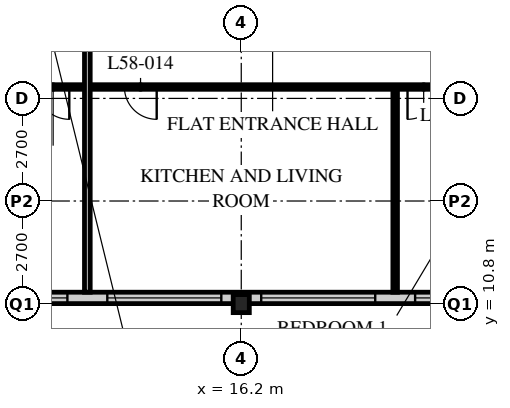
"""IFC4 building model, lengths in metres.
Left out: names, types, materials, properties, quantities, classifications, styles, units other than length and angle.
Written with IfcOpenShell. Run it as: python <this file> out.ifc"""

import sys

from ifc_helpers import new_model, si_unit, direction, frame, frame_2d, origin, origin_2d, place, context, subcontext, project, spatial, rectangle, i_section, extrude, element, fill, save


model = new_model("IFC4")
c1 = context("Model", 3, precision=1e-05, world=origin(), true_north=direction((0.0, 1.0)))
c2 = subcontext(c1, "Body", "Model", "MODEL_VIEW")
j1 = project(units=[si_unit("LENGTHUNIT", "METRE"), si_unit("PLANEANGLEUNIT", "RADIAN")], contexts=[c1])
p1 = place(None, origin())
s1 = spatial("IfcSite", under=j1, at=p1, CompositionType="ELEMENT")
p2 = place(p1, origin())
s2 = spatial("IfcBuilding", under=s1, at=p2, CompositionType="ELEMENT")
p3 = place(p2, frame((0.0, 0.0, 224.4)))
s3 = spatial("IfcBuildingStorey", under=s2, at=p3, CompositionType="ELEMENT", Elevation=224.4)
p4 = place(p3, frame((16.2, 10.8, 0.0), z_axis=(0.0, 0.0, 1.0), x_axis=(1.0, 0.0, 0.0)))
e1 = element("IfcColumn", 1, at=p4, inside=s3, PredefinedType="COLUMN", context=c2, shape_type="SweptSolid", body=[
    extrude(i_section(OverallWidth=0.424, OverallDepth=0.475, WebThickness=0.048, FlangeThickness=0.077, FilletRadius=0.015, at=origin_2d()), origin(), (0.0, 0.0, 1.0), 3.6),
])
p5 = place(p3, frame((8.4, 10.95, 0.0), z_axis=(0.0, 0.0, 1.0), x_axis=(1.0, 0.0, 0.0)))
e2 = element("IfcWall", 2, at=p5, inside=s3, PredefinedType="SOLIDWALL", context=c2, shape_type="SweptSolid", body=[
    extrude(rectangle(XDim=40.2, YDim=0.3, at=frame_2d((20.1, 0.0))), origin(), (0.0, 0.0, 1.0), 3.39),
])
p6 = place(p5, frame((0.225, 0.0, 0.6)))
e3 = element("IfcOpeningElement", 3, at=p6, cuts=e2, PredefinedType="OPENING", context=c2, shape_type="SweptSolid", body=[
    extrude(rectangle(XDim=3.0, YDim=2.0, at=frame_2d((1.5, 1.0))), frame((0.0, 0.16, 0.0), z_axis=(0.0, -1.0, 0.0), x_axis=(1.0, 0.0, 0.0)), (0.0, 0.0, 1.0), 0.32),
])
p7 = place(p5, frame((4.275, 0.0, 0.6)))
e4 = element("IfcOpeningElement", 4, at=p7, cuts=e2, PredefinedType="OPENING", context=c2, shape_type="SweptSolid", body=[
    extrude(rectangle(XDim=3.0, YDim=2.0, at=frame_2d((1.5, 1.0))), frame((0.0, 0.16, 0.0), z_axis=(0.0, -1.0, 0.0), x_axis=(1.0, 0.0, 0.0)), (0.0, 0.0, 1.0), 0.32),
])
p8 = place(p5, frame((8.325, 0.0, 0.6)))
e5 = element("IfcOpeningElement", 5, at=p8, cuts=e2, PredefinedType="OPENING", context=c2, shape_type="SweptSolid", body=[
    extrude(rectangle(XDim=3.0, YDim=2.0, at=frame_2d((1.5, 1.0))), frame((0.0, 0.16, 0.0), z_axis=(0.0, -1.0, 0.0), x_axis=(1.0, 0.0, 0.0)), (0.0, 0.0, 1.0), 0.32),
])
p9 = place(p5, frame((12.375, 0.0, 0.6)))
e6 = element("IfcOpeningElement", 6, at=p9, cuts=e2, PredefinedType="OPENING", context=c2, shape_type="SweptSolid", body=[
    extrude(rectangle(XDim=3.0, YDim=2.0, at=frame_2d((1.5, 1.0))), frame((0.0, 0.16, 0.0), z_axis=(0.0, -1.0, 0.0), x_axis=(1.0, 0.0, 0.0)), (0.0, 0.0, 1.0), 0.32),
])
p10 = place(p5, frame((16.425, 0.0, 0.6)))
e7 = element("IfcOpeningElement", 7, at=p10, cuts=e2, PredefinedType="OPENING", context=c2, shape_type="SweptSolid", body=[
    extrude(rectangle(XDim=3.0, YDim=2.0, at=frame_2d((1.5, 1.0))), frame((0.0, 0.16, 0.0), z_axis=(0.0, -1.0, 0.0), x_axis=(1.0, 0.0, 0.0)), (0.0, 0.0, 1.0), 0.32),
])
p11 = place(p5, frame((20.475, 0.0, 0.6)))
e8 = element("IfcOpeningElement", 8, at=p11, cuts=e2, PredefinedType="OPENING", context=c2, shape_type="SweptSolid", body=[
    extrude(rectangle(XDim=3.0, YDim=2.0, at=frame_2d((1.5, 1.0))), frame((0.0, 0.16, 0.0), z_axis=(0.0, -1.0, 0.0), x_axis=(1.0, 0.0, 0.0)), (0.0, 0.0, 1.0), 0.32),
])
p12 = place(p5, frame((24.525, 0.0, 0.6)))
e9 = element("IfcOpeningElement", 9, at=p12, cuts=e2, PredefinedType="OPENING", context=c2, shape_type="SweptSolid", body=[
    extrude(rectangle(XDim=3.0, YDim=2.0, at=frame_2d((1.5, 1.0))), frame((0.0, 0.16, 0.0), z_axis=(0.0, -1.0, 0.0), x_axis=(1.0, 0.0, 0.0)), (0.0, 0.0, 1.0), 0.32),
])
p13 = place(p5, frame((28.575, 0.0, 0.6)))
e10 = element("IfcOpeningElement", 10, at=p13, cuts=e2, PredefinedType="OPENING", context=c2, shape_type="SweptSolid", body=[
    extrude(rectangle(XDim=3.0, YDim=2.0, at=frame_2d((1.5, 1.0))), frame((0.0, 0.16, 0.0), z_axis=(0.0, -1.0, 0.0), x_axis=(1.0, 0.0, 0.0)), (0.0, 0.0, 1.0), 0.32),
])
p14 = place(p5, frame((32.625, 0.0, 0.6)))
e11 = element("IfcOpeningElement", 11, at=p14, cuts=e2, PredefinedType="OPENING", context=c2, shape_type="SweptSolid", body=[
    extrude(rectangle(XDim=3.0, YDim=2.0, at=frame_2d((1.5, 1.0))), frame((0.0, 0.16, 0.0), z_axis=(0.0, -1.0, 0.0), x_axis=(1.0, 0.0, 0.0)), (0.0, 0.0, 1.0), 0.32),
])
p15 = place(p5, frame((36.675, 0.0, 0.6)))
e12 = element("IfcOpeningElement", 12, at=p15, cuts=e2, PredefinedType="OPENING", context=c2, shape_type="SweptSolid", body=[
    extrude(rectangle(XDim=3.0, YDim=2.0, at=frame_2d((1.5, 1.0))), frame((0.0, 0.16, 0.0), z_axis=(0.0, -1.0, 0.0), x_axis=(1.0, 0.0, 0.0)), (0.0, 0.0, 1.0), 0.32),
])
p16 = place(p3, frame((20.25, 16.5, 0.0), z_axis=(0.0, 0.0, 1.0), x_axis=(0.0, -1.0, 0.0)))
e13 = element("IfcWall", 13, at=p16, inside=s3, PredefinedType="PARTITIONING", context=c2, shape_type="SweptSolid", body=[
    extrude(rectangle(XDim=5.4, YDim=0.12, at=frame_2d((2.7, 0.0))), origin(), (0.0, 0.0, 1.0), 3.39),
])
p17 = place(p3, frame((8.1, 16.5, 0.0), z_axis=(0.0, 0.0, 1.0), x_axis=(1.0, 0.0, 0.0)))
e14 = element("IfcWall", 14, at=p17, inside=s3, PredefinedType="PARTITIONING", context=c2, shape_type="SweptSolid", body=[
    extrude(rectangle(XDim=28.35, YDim=0.12, at=frame_2d((14.175, 0.0))), origin(), (0.0, 0.0, 1.0), 3.39),
])
p18 = place(p17, frame((5.025, 0.0, 0.0)))
e15 = element("IfcOpeningElement", 15, at=p18, cuts=e14, PredefinedType="OPENING", context=c2, shape_type="SweptSolid", body=[
    extrude(rectangle(XDim=0.85, YDim=2.1, at=frame_2d((0.425, 1.05))), frame((0.0, 0.07, 0.0), z_axis=(0.0, -1.0, 0.0), x_axis=(1.0, 0.0, 0.0)), (0.0, 0.0, 1.0), 0.14),
])
p19 = place(p17, frame((12.475, 0.0, 0.0)))
e16 = element("IfcOpeningElement", 16, at=p19, cuts=e14, PredefinedType="OPENING", context=c2, shape_type="SweptSolid", body=[
    extrude(rectangle(XDim=0.85, YDim=2.1, at=frame_2d((0.425, 1.05))), frame((0.0, 0.07, 0.0), z_axis=(0.0, -1.0, 0.0), x_axis=(1.0, 0.0, 0.0)), (0.0, 0.0, 1.0), 0.14),
])
p20 = place(p17, frame((17.175, 0.0, 0.0)))
e17 = element("IfcOpeningElement", 17, at=p20, cuts=e14, PredefinedType="OPENING", context=c2, shape_type="SweptSolid", body=[
    extrude(rectangle(XDim=0.85, YDim=2.1, at=frame_2d((0.425, 1.05))), frame((0.0, 0.07, 0.0), z_axis=(0.0, -1.0, 0.0), x_axis=(1.0, 0.0, 0.0)), (0.0, 0.0, 1.0), 0.14),
])
p21 = place(p17, frame((24.625, 0.0, 0.0)))
e18 = element("IfcOpeningElement", 18, at=p21, cuts=e14, PredefinedType="OPENING", context=c2, shape_type="SweptSolid", body=[
    extrude(rectangle(XDim=0.85, YDim=2.1, at=frame_2d((0.425, 1.05))), frame((0.0, 0.07, 0.0), z_axis=(0.0, -1.0, 0.0), x_axis=(1.0, 0.0, 0.0)), (0.0, 0.0, 1.0), 0.14),
])
p22 = place(p17, frame((2.725, 0.0, 0.0)))
e19 = element("IfcOpeningElement", 19, at=p22, cuts=e14, PredefinedType="OPENING", context=c2, shape_type="SweptSolid", body=[
    extrude(rectangle(XDim=0.85, YDim=2.1, at=frame_2d((0.425, 1.05))), frame((0.0, 0.07, 0.0), z_axis=(0.0, -1.0, 0.0), x_axis=(1.0, 0.0, 0.0)), (0.0, 0.0, 1.0), 0.14),
])
p23 = place(p3, frame((12.15, 18.9, 0.0), z_axis=(0.0, 0.0, 1.0), x_axis=(0.0, -1.0, 0.0)))
e20 = element("IfcWall", 20, at=p23, inside=s3, PredefinedType="PARTITIONING", context=c2, shape_type="SweptSolid", body=[
    extrude(rectangle(XDim=7.8, YDim=0.15, at=frame_2d((3.9, 0.0))), origin(), (0.0, 0.0, 1.0), 3.39),
])
p24 = place(p6, origin())
e21 = element("IfcWindow", 21, at=p24, inside=s3, PartitioningType="SINGLE_PANEL", PredefinedType="WINDOW", context=c2, shape_type="SweptSolid", body=[
    extrude(rectangle(XDim=3.0, YDim=2.0, at=frame_2d((1.5, 1.0))), frame((0.0, 0.03, 0.0), z_axis=(0.0, -1.0, 0.0), x_axis=(1.0, 0.0, 0.0)), (0.0, 0.0, 1.0), 0.06),
])
fill(e3, e21)
p25 = place(p7, origin())
e22 = element("IfcWindow", 22, at=p25, inside=s3, PartitioningType="SINGLE_PANEL", PredefinedType="WINDOW", context=c2, shape_type="SweptSolid", body=[
    extrude(rectangle(XDim=3.0, YDim=2.0, at=frame_2d((1.5, 1.0))), frame((0.0, 0.03, 0.0), z_axis=(0.0, -1.0, 0.0), x_axis=(1.0, 0.0, 0.0)), (0.0, 0.0, 1.0), 0.06),
])
fill(e4, e22)
p26 = place(p8, origin())
e23 = element("IfcWindow", 23, at=p26, inside=s3, PartitioningType="SINGLE_PANEL", PredefinedType="WINDOW", context=c2, shape_type="SweptSolid", body=[
    extrude(rectangle(XDim=3.0, YDim=2.0, at=frame_2d((1.5, 1.0))), frame((0.0, 0.03, 0.0), z_axis=(0.0, -1.0, 0.0), x_axis=(1.0, 0.0, 0.0)), (0.0, 0.0, 1.0), 0.06),
])
fill(e5, e23)
p27 = place(p9, origin())
e24 = element("IfcWindow", 24, at=p27, inside=s3, PartitioningType="SINGLE_PANEL", PredefinedType="WINDOW", context=c2, shape_type="SweptSolid", body=[
    extrude(rectangle(XDim=3.0, YDim=2.0, at=frame_2d((1.5, 1.0))), frame((0.0, 0.03, 0.0), z_axis=(0.0, -1.0, 0.0), x_axis=(1.0, 0.0, 0.0)), (0.0, 0.0, 1.0), 0.06),
])
fill(e6, e24)
p28 = place(p18, origin())
e25 = element("IfcDoor", 25, at=p28, inside=s3, OperationType="SINGLE_SWING_LEFT", PredefinedType="DOOR", context=c2, shape_type="SweptSolid", body=[
    extrude(rectangle(XDim=0.85, YDim=2.1, at=frame_2d((0.425, 1.05))), frame((0.0, 0.025, 0.0), z_axis=(0.0, -1.0, 0.0), x_axis=(1.0, 0.0, 0.0)), (0.0, 0.0, 1.0), 0.05),
])
fill(e15, e25)
p29 = place(p19, origin())
e26 = element("IfcDoor", 26, at=p29, inside=s3, OperationType="SINGLE_SWING_RIGHT", PredefinedType="DOOR", context=c2, shape_type="SweptSolid", body=[
    extrude(rectangle(XDim=0.85, YDim=2.1, at=frame_2d((0.425, 1.05))), frame((0.0, 0.025, 0.0), z_axis=(0.0, -1.0, 0.0), x_axis=(1.0, 0.0, 0.0)), (0.0, 0.0, 1.0), 0.05),
])
fill(e16, e26)
p30 = place(p22, origin())
e27 = element("IfcDoor", 27, at=p30, inside=s3, OperationType="SINGLE_SWING_LEFT", PredefinedType="DOOR", context=c2, shape_type="SweptSolid", body=[
    extrude(rectangle(XDim=0.85, YDim=2.1, at=frame_2d((0.425, 1.05))), frame((0.0, 0.025, 0.0), z_axis=(0.0, -1.0, 0.0), x_axis=(1.0, 0.0, 0.0)), (0.0, 0.0, 1.0), 0.05),
])
fill(e19, e27)
save(model, sys.argv[1])
